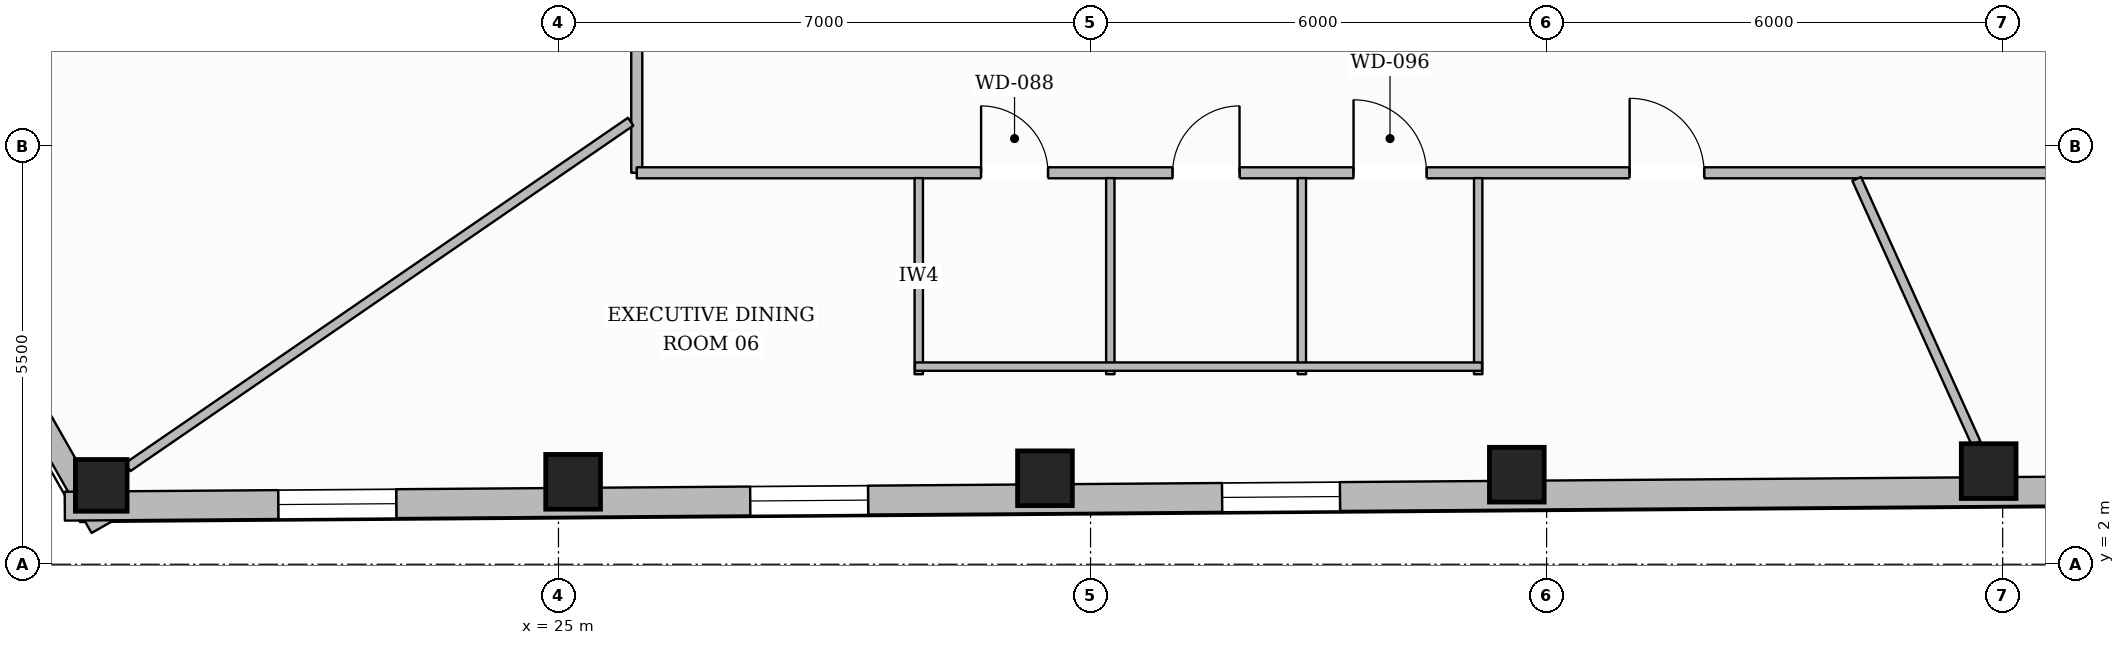
"""IFC4 building model, lengths in metres.
Left out: names, types, materials, properties, quantities, classifications, styles, units other than length and angle.
Written with IfcOpenShell. Run it as: python <this file> out.ifc"""

import sys

from ifc_helpers import new_model, si_unit, direction, frame, frame_2d, origin, origin_2d, place, context, subcontext, project, spatial, rectangle, hollow_rectangle, extrude, element, fill, save


model = new_model("IFC4")
c1 = context("Model", 3, precision=1e-05, world=origin(), true_north=direction((0.0, 1.0)))
c2 = subcontext(c1, "Body", "Model", "MODEL_VIEW")
j1 = project(units=[si_unit("LENGTHUNIT", "METRE"), si_unit("PLANEANGLEUNIT", "RADIAN")], contexts=[c1])
p1 = place(None, origin())
s1 = spatial("IfcSite", under=j1, at=p1, CompositionType="ELEMENT")
p2 = place(p1, origin())
s2 = spatial("IfcBuilding", under=s1, at=p2, CompositionType="ELEMENT")
p3 = place(p2, frame((0.0, 0.0, 150.95)))
s3 = spatial("IfcBuildingStorey", under=s2, at=p3, CompositionType="ELEMENT", Elevation=150.95)
p4 = place(p3, frame((18.985, 3.038, 0.0), z_axis=(0.0, 0.0, 1.0), x_axis=(1.0, 0.0, 0.0)))
e1 = element("IfcColumn", 1, at=p4, inside=s3, PredefinedType="COLUMN", context=c2, shape_type="SweptSolid", body=[
    extrude(hollow_rectangle(XDim=0.68, YDim=0.68, WallThickness=0.03, at=origin_2d()), origin(), (0.0, 0.0, 1.0), 3.43),
])
for number, where, z_axis, x_axis in (
    (2, (25.192, 3.084, 0.0), (0.0, 0.0, 1.0), (1.0, 0.0, 0.0)),
    (3, (31.4, 3.131, 0.0), (0.0, 0.0, 1.0), (1.0, 0.0, 0.0)),
    (4, (37.608, 3.178, 0.0), (0.0, 0.0, 1.0), (1.0, 0.0, 0.0)),
    (5, (43.816, 3.225, 0.0), (0.0, 0.0, 1.0), (1.0, 0.0, 0.0)),
):
    element("IfcColumn", number, at=place(p3, frame(where, z_axis=z_axis, x_axis=x_axis)), inside=s3, PredefinedType="COLUMN", context=c2, shape_type="SweptSolid", body=[
        extrude(hollow_rectangle(XDim=0.72, YDim=0.72, WallThickness=0.032, at=origin_2d()), origin(), (0.0, 0.0, 1.0), 3.43),
    ])
p5 = place(p3, frame((18.988, 2.486, 0.0), z_axis=(0.0, 0.0, 1.0), x_axis=(-0.494355320485, 0.869259924941, 0.0)))
e6 = element("IfcWall", 6, at=p5, inside=s3, PredefinedType="STANDARD", context=c2, shape_type="SweptSolid", body=[
    extrude(rectangle(XDim=11.446, YDim=0.3, at=frame_2d((5.723, 0.0))), origin(), (0.0, 0.0, 1.0), 2.889),
])
p6 = place(p5, frame((5.123, 0.0, 0.65)))
e7 = element("IfcOpeningElement", 7, at=p6, cuts=e6, PredefinedType="OPENING", context=c2, shape_type="SweptSolid", body=[
    extrude(rectangle(XDim=1.2, YDim=1.55, at=frame_2d((0.6, 0.775))), frame((0.0, 0.16, 0.0), z_axis=(0.0, -1.0, 0.0), x_axis=(1.0, 0.0, 0.0)), (0.0, 0.0, 1.0), 0.32),
])
p7 = place(p3, frame((56.708, 3.052, 0.0), z_axis=(0.0, 0.0, 1.0), x_axis=(-0.999971472173, -0.007553465491, 0.0)))
e8 = element("IfcWall", 8, at=p7, inside=s3, PredefinedType="STANDARD", context=c2, shape_type="SweptSolid", body=[
    extrude(rectangle(XDim=38.204, YDim=0.38, at=frame_2d((19.102, 0.0))), origin(), (0.0, 0.0, 1.0), 2.889),
])
p8 = place(p7, frame((33.844, 0.0, 0.55)))
e9 = element("IfcOpeningElement", 9, at=p8, cuts=e8, PredefinedType="OPENING", context=c2, shape_type="SweptSolid", body=[
    extrude(rectangle(XDim=1.55, YDim=1.6, at=frame_2d((0.775, 0.8))), frame((0.0, 0.2, 0.0), z_axis=(0.0, -1.0, 0.0), x_axis=(1.0, 0.0, 0.0)), (0.0, 0.0, 1.0), 0.4),
])
p9 = place(p7, frame((27.635, 0.0, 0.55)))
e10 = element("IfcOpeningElement", 10, at=p9, cuts=e8, PredefinedType="OPENING", context=c2, shape_type="SweptSolid", body=[
    extrude(rectangle(XDim=1.55, YDim=1.6, at=frame_2d((0.775, 0.8))), frame((0.0, 0.2, 0.0), z_axis=(0.0, -1.0, 0.0), x_axis=(1.0, 0.0, 0.0)), (0.0, 0.0, 1.0), 0.4),
])
p10 = place(p7, frame((21.427, 0.0, 0.55)))
e11 = element("IfcOpeningElement", 11, at=p10, cuts=e8, PredefinedType="OPENING", context=c2, shape_type="SweptSolid", body=[
    extrude(rectangle(XDim=1.55, YDim=1.6, at=frame_2d((0.775, 0.8))), frame((0.0, 0.2, 0.0), z_axis=(0.0, -1.0, 0.0), x_axis=(1.0, 0.0, 0.0)), (0.0, 0.0, 1.0), 0.4),
])
p11 = place(p7, frame((9.011, 0.0, 0.55)))
e12 = element("IfcOpeningElement", 12, at=p11, cuts=e8, PredefinedType="OPENING", context=c2, shape_type="SweptSolid", body=[
    extrude(rectangle(XDim=1.55, YDim=1.6, at=frame_2d((0.775, 0.8))), frame((0.0, 0.2, 0.0), z_axis=(0.0, -1.0, 0.0), x_axis=(1.0, 0.0, 0.0)), (0.0, 0.0, 1.0), 0.4),
])
p12 = place(p7, frame((2.803, 0.0, 0.55)))
e13 = element("IfcOpeningElement", 13, at=p12, cuts=e8, PredefinedType="OPENING", context=c2, shape_type="SweptSolid", body=[
    extrude(rectangle(XDim=1.55, YDim=1.6, at=frame_2d((0.775, 0.8))), frame((0.0, 0.2, 0.0), z_axis=(0.0, -1.0, 0.0), x_axis=(1.0, 0.0, 0.0)), (0.0, 0.0, 1.0), 0.4),
])
p13 = place(p3, frame((26.03, 25.05, 0.0), z_axis=(0.0, 0.0, 1.0), x_axis=(0.0, -1.0, 0.0)))
e14 = element("IfcWall", 14, at=p13, inside=s3, PredefinedType="PARTITIONING", context=c2, shape_type="SweptSolid", body=[
    extrude(rectangle(XDim=17.9, YDim=0.145, at=frame_2d((8.95, 0.0))), origin(), (0.0, 0.0, 1.0), 3.118),
])
p14 = place(p13, frame((3.644, 0.0, 0.0)))
e15 = element("IfcOpeningElement", 15, at=p14, cuts=e14, PredefinedType="OPENING", context=c2, shape_type="SweptSolid", body=[
    extrude(rectangle(XDim=0.98, YDim=2.15, at=frame_2d((0.49, 1.075))), frame((0.0, 0.083, 0.0), z_axis=(0.0, -1.0, 0.0), x_axis=(1.0, 0.0, 0.0)), (0.0, 0.0, 1.0), 0.165),
])
p15 = place(p13, frame((11.936, 0.0, 0.0)))
e16 = element("IfcOpeningElement", 16, at=p15, cuts=e14, PredefinedType="OPENING", context=c2, shape_type="SweptSolid", body=[
    extrude(rectangle(XDim=1.4, YDim=2.2, at=frame_2d((0.7, 1.1))), frame((0.0, 0.083, 0.0), z_axis=(0.0, -1.0, 0.0), x_axis=(1.0, 0.0, 0.0)), (0.0, 0.0, 1.0), 0.165),
])
p16 = place(p3, frame((26.03, 7.15, 0.0), z_axis=(0.0, 0.0, 1.0), x_axis=(1.0, 0.0, 0.0)))
e17 = element("IfcWall", 17, at=p16, inside=s3, PredefinedType="PARTITIONING", context=c2, shape_type="SweptSolid", body=[
    extrude(rectangle(XDim=23.94, YDim=0.145, at=frame_2d((11.97, 0.0))), origin(), (0.0, 0.0, 1.0), 3.43),
])
p17 = place(p16, frame((4.53, 0.0, 0.0)))
e18 = element("IfcOpeningElement", 18, at=p17, cuts=e17, PredefinedType="OPENING", context=c2, shape_type="SweptSolid", body=[
    extrude(rectangle(XDim=0.88, YDim=2.1, at=frame_2d((0.44, 1.05))), frame((0.0, 0.083, 0.0), z_axis=(0.0, -1.0, 0.0), x_axis=(1.0, 0.0, 0.0)), (0.0, 0.0, 1.0), 0.165),
])
p18 = place(p16, frame((7.05, 0.0, 0.0)))
e19 = element("IfcOpeningElement", 19, at=p18, cuts=e17, PredefinedType="OPENING", context=c2, shape_type="SweptSolid", body=[
    extrude(rectangle(XDim=0.88, YDim=2.1, at=frame_2d((0.44, 1.05))), frame((0.0, 0.083, 0.0), z_axis=(0.0, -1.0, 0.0), x_axis=(1.0, 0.0, 0.0)), (0.0, 0.0, 1.0), 0.165),
])
p19 = place(p16, frame((9.43, 0.0, 0.0)))
e20 = element("IfcOpeningElement", 20, at=p19, cuts=e17, PredefinedType="OPENING", context=c2, shape_type="SweptSolid", body=[
    extrude(rectangle(XDim=0.96, YDim=2.1, at=frame_2d((0.48, 1.05))), frame((0.0, 0.083, 0.0), z_axis=(0.0, -1.0, 0.0), x_axis=(1.0, 0.0, 0.0)), (0.0, 0.0, 1.0), 0.165),
])
p20 = place(p16, frame((13.062, 0.0, 0.0)))
e21 = element("IfcOpeningElement", 21, at=p20, cuts=e17, PredefinedType="OPENING", context=c2, shape_type="SweptSolid", body=[
    extrude(rectangle(XDim=0.98, YDim=2.15, at=frame_2d((0.49, 1.075))), frame((0.0, 0.083, 0.0), z_axis=(0.0, -1.0, 0.0), x_axis=(1.0, 0.0, 0.0)), (0.0, 0.0, 1.0), 0.165),
])
p21 = place(p16, frame((19.41, 0.0, 0.0)))
e22 = element("IfcOpeningElement", 22, at=p21, cuts=e17, PredefinedType="OPENING", context=c2, shape_type="SweptSolid", body=[
    extrude(rectangle(XDim=1.4, YDim=2.2, at=frame_2d((0.7, 1.1))), frame((0.0, 0.083, 0.0), z_axis=(0.0, -1.0, 0.0), x_axis=(1.0, 0.0, 0.0)), (0.0, 0.0, 1.0), 0.165),
])
for number, where, z_axis, x_axis in (
    (23, (29.74, 4.5, 0.0), (0.0, 0.0, 1.0), (0.0, 1.0, 0.0)),
    (24, (32.26, 4.5, 0.0), (0.0, 0.0, 1.0), (0.0, 1.0, 0.0)),
    (25, (34.78, 4.5, 0.0), (0.0, 0.0, 1.0), (0.0, 1.0, 0.0)),
    (26, (37.1, 4.5, 0.0), (0.0, 0.0, 1.0), (0.0, 1.0, 0.0)),
):
    element("IfcWall", number, at=place(p3, frame(where, z_axis=z_axis, x_axis=x_axis)), inside=s3, PredefinedType="PLUMBINGWALL", context=c2, shape_type="SweptSolid", body=[
        extrude(rectangle(XDim=2.58, YDim=0.11, at=frame_2d((1.29, 0.0))), origin(), (0.0, 0.0, 1.0), 3.43),
    ])
p22 = place(p3, frame((29.69, 4.6, 0.0), z_axis=(0.0, 0.0, 1.0), x_axis=(1.0, 0.0, 0.0)))
e27 = element("IfcWall", 27, at=p22, inside=s3, PredefinedType="PLUMBINGWALL", context=c2, shape_type="SweptSolid", body=[
    extrude(rectangle(XDim=7.46, YDim=0.11, at=frame_2d((3.73, 0.0))), origin(), (0.0, 0.0, 1.0), 3.43),
])
p23 = place(p3, frame((25.949, 7.822, 0.0), z_axis=(0.0, 0.0, 1.0), x_axis=(-0.824259265704, -0.566212559823, 0.0)))
e28 = element("IfcWall", 28, at=p23, inside=s3, PredefinedType="PARTITIONING", context=c2, shape_type="SweptSolid", body=[
    extrude(rectangle(XDim=8.028, YDim=0.125, at=frame_2d((4.014, 0.0))), origin(), (0.0, 0.0, 1.0), 2.971),
])
p24 = place(p3, frame((42.079, 7.07, 0.0), z_axis=(0.0, 0.0, 1.0), x_axis=(0.411694746123, -0.911321807056, 0.0)))
e29 = element("IfcWall", 29, at=p24, inside=s3, PredefinedType="PARTITIONING", context=c2, shape_type="SweptSolid", body=[
    extrude(rectangle(XDim=3.815, YDim=0.125, at=frame_2d((1.907, 0.0))), origin(), (0.0, 0.0, 1.0), 3.43),
])
p25 = place(p8, origin())
e30 = element("IfcWindow", 30, at=p25, inside=s3, PartitioningType="SINGLE_PANEL", PredefinedType="WINDOW", context=c2, shape_type="SweptSolid", body=[
    extrude(rectangle(XDim=1.55, YDim=1.6, at=frame_2d((0.775, 0.8))), frame((0.0, 0.03, 0.0), z_axis=(0.0, -1.0, 0.0), x_axis=(1.0, 0.0, 0.0)), (0.0, 0.0, 1.0), 0.06),
])
fill(e9, e30)
p26 = place(p9, origin())
e31 = element("IfcWindow", 31, at=p26, inside=s3, PartitioningType="SINGLE_PANEL", PredefinedType="WINDOW", context=c2, shape_type="SweptSolid", body=[
    extrude(rectangle(XDim=1.55, YDim=1.6, at=frame_2d((0.775, 0.8))), frame((0.0, 0.03, 0.0), z_axis=(0.0, -1.0, 0.0), x_axis=(1.0, 0.0, 0.0)), (0.0, 0.0, 1.0), 0.06),
])
fill(e10, e31)
p27 = place(p10, origin())
e32 = element("IfcWindow", 32, at=p27, inside=s3, PartitioningType="SINGLE_PANEL", PredefinedType="WINDOW", context=c2, shape_type="SweptSolid", body=[
    extrude(rectangle(XDim=1.55, YDim=1.6, at=frame_2d((0.775, 0.8))), frame((0.0, 0.03, 0.0), z_axis=(0.0, -1.0, 0.0), x_axis=(1.0, 0.0, 0.0)), (0.0, 0.0, 1.0), 0.06),
])
fill(e11, e32)
p28 = place(p17, origin())
e33 = element("IfcDoor", 33, at=p28, inside=s3, OperationType="SINGLE_SWING_LEFT", PredefinedType="DOOR", context=c2, shape_type="SweptSolid", body=[
    extrude(rectangle(XDim=0.88, YDim=2.1, at=frame_2d((0.44, 1.05))), frame((0.0, 0.025, 0.0), z_axis=(0.0, -1.0, 0.0), x_axis=(1.0, 0.0, 0.0)), (0.0, 0.0, 1.0), 0.05),
])
fill(e18, e33)
p29 = place(p18, origin())
e34 = element("IfcDoor", 34, at=p29, inside=s3, OperationType="SINGLE_SWING_RIGHT", PredefinedType="DOOR", context=c2, shape_type="SweptSolid", body=[
    extrude(rectangle(XDim=0.88, YDim=2.1, at=frame_2d((0.44, 1.05))), frame((0.0, 0.025, 0.0), z_axis=(0.0, -1.0, 0.0), x_axis=(1.0, 0.0, 0.0)), (0.0, 0.0, 1.0), 0.05),
])
fill(e19, e34)
p30 = place(p19, origin())
e35 = element("IfcDoor", 35, at=p30, inside=s3, OperationType="SINGLE_SWING_LEFT", PredefinedType="DOOR", context=c2, shape_type="SweptSolid", body=[
    extrude(rectangle(XDim=0.96, YDim=2.1, at=frame_2d((0.48, 1.05))), frame((0.0, 0.025, 0.0), z_axis=(0.0, -1.0, 0.0), x_axis=(1.0, 0.0, 0.0)), (0.0, 0.0, 1.0), 0.05),
])
fill(e20, e35)
p31 = place(p20, origin())
e36 = element("IfcDoor", 36, at=p31, inside=s3, OperationType="SINGLE_SWING_LEFT", PredefinedType="DOOR", context=c2, shape_type="SweptSolid", body=[
    extrude(rectangle(XDim=0.98, YDim=2.15, at=frame_2d((0.49, 1.075))), frame((0.0, 0.025, 0.0), z_axis=(0.0, -1.0, 0.0), x_axis=(1.0, 0.0, 0.0)), (0.0, 0.0, 1.0), 0.05),
])
fill(e21, e36)
save(model, sys.argv[1])
